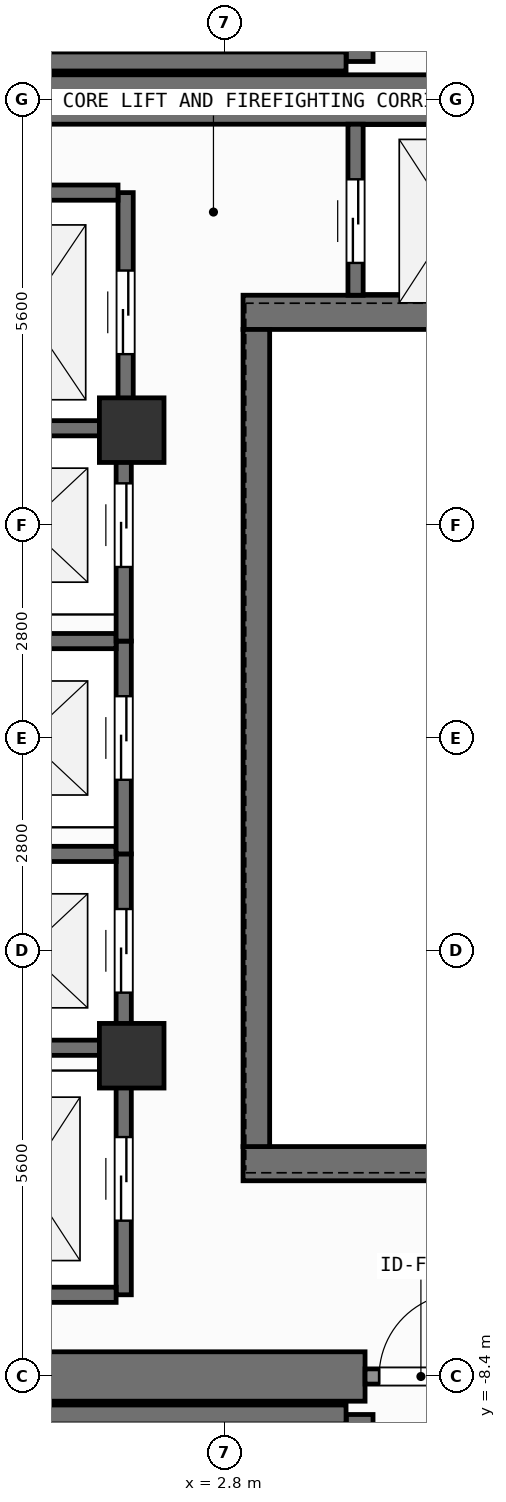
"""IFC4 building model, lengths in metres.
Left out: names, types, materials, properties, quantities, classifications, styles, units other than length and angle.
Written with IfcOpenShell. Run it as: python <this file> out.ifc"""

import sys

from ifc_helpers import new_model, si_unit, direction, frame, frame_2d, origin, origin_2d, place, context, subcontext, project, spatial, rectangle, extrude, element, fill, save


model = new_model("IFC4")
c1 = context("Model", 3, precision=1e-05, world=origin(), true_north=direction((0.0, 1.0)))
c2 = subcontext(c1, "Body", "Model", "MODEL_VIEW")
j1 = project(units=[si_unit("LENGTHUNIT", "METRE"), si_unit("PLANEANGLEUNIT", "RADIAN")], contexts=[c1])
p1 = place(None, origin())
s1 = spatial("IfcSite", under=j1, at=p1, CompositionType="ELEMENT")
p2 = place(p1, origin())
s2 = spatial("IfcBuilding", under=s1, at=p2, CompositionType="ELEMENT")
p3 = place(p2, frame((0.0, 0.0, 301.5)))
s3 = spatial("IfcBuildingStorey", under=s2, at=p3, CompositionType="ELEMENT", Elevation=301.5)
p4 = place(p3, frame((-2.62, -8.4, 0.0), z_axis=(0.0, 0.0, 1.0), x_axis=(1.0, 0.0, 0.0)))
e1 = element("IfcWall", 1, at=p4, inside=s3, PredefinedType="SHEAR", context=c2, shape_type="SweptSolid", body=[
    extrude(rectangle(XDim=7.27, YDim=0.65, at=frame_2d((3.635, 0.0))), origin(), (0.0, 0.0, 1.0), 3.9),
])
p5 = place(p3, frame((-7.55, 8.4, 0.0), z_axis=(0.0, 0.0, 1.0), x_axis=(1.0, 0.0, 0.0)))
e2 = element("IfcWall", 2, at=p5, inside=s3, PredefinedType="SHEAR", context=c2, shape_type="SweptSolid", body=[
    extrude(rectangle(XDim=16.275, YDim=0.65, at=frame_2d((8.138, 0.0))), origin(), (0.0, 0.0, 1.0), 3.9),
])
for number, where, z_axis, x_axis in (
    (3, (3.045, -5.6, 0.0), (0.0, 0.0, 1.0), (1.0, 0.0, 0.0)),
    (4, (3.045, 5.6, 0.0), (0.0, 0.0, 1.0), (1.0, 0.0, 0.0)),
):
    element("IfcWall", number, at=place(p3, frame(where, z_axis=z_axis, x_axis=x_axis)), inside=s3, PredefinedType="SHEAR", context=c2, shape_type="SweptSolid", body=[
        extrude(rectangle(XDim=5.68, YDim=0.45, at=frame_2d((2.84, 0.0))), origin(), (0.0, 0.0, 1.0), 3.9),
    ])
p6 = place(p3, frame((3.22, -5.375, 0.0), z_axis=(0.0, 0.0, 1.0), x_axis=(0.0, 1.0, 0.0)))
e5 = element("IfcWall", 5, at=p6, inside=s3, PredefinedType="SHEAR", context=c2, shape_type="SweptSolid", body=[
    extrude(rectangle(XDim=10.75, YDim=0.35, at=frame_2d((5.375, 0.0))), origin(), (0.0, 0.0, 1.0), 3.9),
])
p7 = place(p3, frame((-2.2, -8.9, 0.0), z_axis=(0.0, 0.0, 1.0), x_axis=(1.0, 0.0, 0.0)))
e6 = element("IfcWall", 6, at=p7, inside=s3, PredefinedType="SHEAR", context=c2, shape_type="SweptSolid", body=[
    extrude(rectangle(XDim=6.6, YDim=0.25, at=frame_2d((3.3, 0.0))), origin(), (0.0, 0.0, 1.0), 3.9),
])
p8 = place(p3, frame((4.58, -8.9, 0.0), z_axis=(0.0, 0.0, 1.0), x_axis=(0.0, -1.0, 0.0)))
e7 = element("IfcWall", 7, at=p8, inside=s3, PredefinedType="SHEAR", context=c2, shape_type="SweptSolid", body=[
    extrude(rectangle(XDim=2.925, YDim=0.35, at=frame_2d((1.462, 0.0))), origin(), (0.0, 0.0, 1.0), 3.9),
])
p9 = place(p8, frame((0.913, 0.0, 0.0)))
e8 = element("IfcOpeningElement", 8, at=p9, cuts=e7, PredefinedType="OPENING", context=c2, shape_type="SweptSolid", body=[
    extrude(rectangle(XDim=1.1, YDim=2.15, at=frame_2d((0.55, 1.075))), frame((0.0, 0.185, 0.0), z_axis=(0.0, -1.0, 0.0), x_axis=(1.0, 0.0, 0.0)), (0.0, 0.0, 1.0), 0.37),
])
p10 = place(p3, frame((-2.2, 8.9, 0.0), z_axis=(0.0, 0.0, 1.0), x_axis=(1.0, 0.0, 0.0)))
e9 = element("IfcWall", 9, at=p10, inside=s3, PredefinedType="SHEAR", context=c2, shape_type="SweptSolid", body=[
    extrude(rectangle(XDim=6.6, YDim=0.25, at=frame_2d((3.3, 0.0))), origin(), (0.0, 0.0, 1.0), 3.9),
])
p11 = place(p3, frame((4.58, 11.825, 0.0), z_axis=(0.0, 0.0, 1.0), x_axis=(0.0, -1.0, 0.0)))
e10 = element("IfcWall", 10, at=p11, inside=s3, PredefinedType="SHEAR", context=c2, shape_type="SweptSolid", body=[
    extrude(rectangle(XDim=2.925, YDim=0.35, at=frame_2d((1.462, 0.0))), origin(), (0.0, 0.0, 1.0), 3.9),
])
p12 = place(p11, frame((0.913, 0.0, 0.0)))
e11 = element("IfcOpeningElement", 11, at=p12, cuts=e10, PredefinedType="OPENING", context=c2, shape_type="SweptSolid", body=[
    extrude(rectangle(XDim=1.1, YDim=2.15, at=frame_2d((0.55, 1.075))), frame((0.0, 0.185, 0.0), z_axis=(0.0, -1.0, 0.0), x_axis=(1.0, 0.0, 0.0)), (0.0, 0.0, 1.0), 0.37),
])
for number, where, z_axis, x_axis in (
    (12, (1.58, -4.18, 0.0), (0.0, 0.0, 1.0), (1.0, 0.0, 0.0)),
    (13, (1.58, 4.05, 0.0), (0.0, 0.0, 1.0), (1.0, 0.0, 0.0)),
):
    element("IfcColumn", number, at=place(p3, frame(where, z_axis=z_axis, x_axis=x_axis)), inside=s3, PredefinedType="COLUMN", context=c2, shape_type="SweptSolid", body=[
        extrude(rectangle(XDim=0.85, YDim=0.85, at=origin_2d()), origin(), (0.0, 0.0, 1.0), 3.9),
    ])
p13 = place(p3, frame((1.475, -4.275, 0.0), z_axis=(0.0, 0.0, 1.0), x_axis=(0.0, 1.0, 0.0)))
e14 = element("IfcWall", 14, at=p13, inside=s3, PredefinedType="SHEAR", context=c2, shape_type="SweptSolid", body=[
    extrude(rectangle(XDim=2.75, YDim=0.2, at=frame_2d((1.375, 0.0))), origin(), (0.0, 0.0, 1.0), 3.68),
])
p14 = place(p13, frame((0.925, 0.0, 0.0)))
e15 = element("IfcOpeningElement", 15, at=p14, cuts=e14, PredefinedType="OPENING", context=c2, shape_type="SweptSolid", body=[
    extrude(rectangle(XDim=1.1, YDim=2.2, at=frame_2d((0.55, 1.1))), frame((0.0, 0.11, 0.0), z_axis=(0.0, -1.0, 0.0), x_axis=(1.0, 0.0, 0.0)), (0.0, 0.0, 1.0), 0.22),
])
for number, where, z_axis, x_axis in (
    (16, (-0.975, -4.075, 0.0), (0.0, 0.0, 1.0), (1.0, 0.0, 0.0)),
    (17, (-0.975, -1.525, 0.0), (0.0, 0.0, 1.0), (1.0, 0.0, 0.0)),
):
    element("IfcWall", number, at=place(p3, frame(where, z_axis=z_axis, x_axis=x_axis)), inside=s3, PredefinedType="SHEAR", context=c2, shape_type="SweptSolid", body=[
        extrude(rectangle(XDim=2.35, YDim=0.2, at=frame_2d((1.175, 0.0))), origin(), (0.0, 0.0, 1.0), 3.68),
    ])
p15 = place(p3, frame((1.475, -1.525, 0.0), z_axis=(0.0, 0.0, 1.0), x_axis=(0.0, 1.0, 0.0)))
e18 = element("IfcWall", 18, at=p15, inside=s3, PredefinedType="SHEAR", context=c2, shape_type="SweptSolid", body=[
    extrude(rectangle(XDim=2.8, YDim=0.2, at=frame_2d((1.4, 0.0))), origin(), (0.0, 0.0, 1.0), 3.68),
])
p16 = place(p15, frame((0.975, 0.0, 0.0)))
e19 = element("IfcOpeningElement", 19, at=p16, cuts=e18, PredefinedType="OPENING", context=c2, shape_type="SweptSolid", body=[
    extrude(rectangle(XDim=1.1, YDim=2.2, at=frame_2d((0.55, 1.1))), frame((0.0, 0.11, 0.0), z_axis=(0.0, -1.0, 0.0), x_axis=(1.0, 0.0, 0.0)), (0.0, 0.0, 1.0), 0.22),
])
p17 = place(p3, frame((-0.975, 1.275, 0.0), z_axis=(0.0, 0.0, 1.0), x_axis=(1.0, 0.0, 0.0)))
e20 = element("IfcWall", 20, at=p17, inside=s3, PredefinedType="SHEAR", context=c2, shape_type="SweptSolid", body=[
    extrude(rectangle(XDim=2.35, YDim=0.2, at=frame_2d((1.175, 0.0))), origin(), (0.0, 0.0, 1.0), 3.68),
])
p18 = place(p3, frame((1.475, 1.275, 0.0), z_axis=(0.0, 0.0, 1.0), x_axis=(0.0, 1.0, 0.0)))
e21 = element("IfcWall", 21, at=p18, inside=s3, PredefinedType="SHEAR", context=c2, shape_type="SweptSolid", body=[
    extrude(rectangle(XDim=2.8, YDim=0.2, at=frame_2d((1.4, 0.0))), origin(), (0.0, 0.0, 1.0), 3.68),
])
p19 = place(p18, frame((0.975, 0.0, 0.0)))
e22 = element("IfcOpeningElement", 22, at=p19, cuts=e21, PredefinedType="OPENING", context=c2, shape_type="SweptSolid", body=[
    extrude(rectangle(XDim=1.1, YDim=2.2, at=frame_2d((0.55, 1.1))), frame((0.0, 0.11, 0.0), z_axis=(0.0, -1.0, 0.0), x_axis=(1.0, 0.0, 0.0)), (0.0, 0.0, 1.0), 0.22),
])
p20 = place(p3, frame((-0.975, 4.075, 0.0), z_axis=(0.0, 0.0, 1.0), x_axis=(1.0, 0.0, 0.0)))
e23 = element("IfcWall", 23, at=p20, inside=s3, PredefinedType="SHEAR", context=c2, shape_type="SweptSolid", body=[
    extrude(rectangle(XDim=2.35, YDim=0.2, at=frame_2d((1.175, 0.0))), origin(), (0.0, 0.0, 1.0), 3.68),
])
p21 = place(p3, frame((1.5, 4.025, 0.0), z_axis=(0.0, 0.0, 1.0), x_axis=(0.0, 1.0, 0.0)))
e24 = element("IfcWall", 24, at=p21, inside=s3, PredefinedType="SHEAR", context=c2, shape_type="SweptSolid", body=[
    extrude(rectangle(XDim=3.15, YDim=0.2, at=frame_2d((1.575, 0.0))), origin(), (0.0, 0.0, 1.0), 3.68),
])
p22 = place(p21, frame((1.025, 0.0, 0.0)))
e25 = element("IfcOpeningElement", 25, at=p22, cuts=e24, PredefinedType="OPENING", context=c2, shape_type="SweptSolid", body=[
    extrude(rectangle(XDim=1.1, YDim=2.2, at=frame_2d((0.55, 1.1))), frame((0.0, 0.11, 0.0), z_axis=(0.0, -1.0, 0.0), x_axis=(1.0, 0.0, 0.0)), (0.0, 0.0, 1.0), 0.22),
])
p23 = place(p3, frame((-1.0, 7.175, 0.0), z_axis=(0.0, 0.0, 1.0), x_axis=(1.0, 0.0, 0.0)))
e26 = element("IfcWall", 26, at=p23, inside=s3, PredefinedType="SHEAR", context=c2, shape_type="SweptSolid", body=[
    extrude(rectangle(XDim=2.4, YDim=0.2, at=frame_2d((1.2, 0.0))), origin(), (0.0, 0.0, 1.0), 3.68),
])
p24 = place(p3, frame((1.475, -7.325, 0.0), z_axis=(0.0, 0.0, 1.0), x_axis=(0.0, 1.0, 0.0)))
e27 = element("IfcWall", 27, at=p24, inside=s3, PredefinedType="SHEAR", context=c2, shape_type="SweptSolid", body=[
    extrude(rectangle(XDim=3.05, YDim=0.2, at=frame_2d((1.525, 0.0))), origin(), (0.0, 0.0, 1.0), 3.68),
])
p25 = place(p24, frame((0.975, 0.0, 0.0)))
e28 = element("IfcOpeningElement", 28, at=p25, cuts=e27, PredefinedType="OPENING", context=c2, shape_type="SweptSolid", body=[
    extrude(rectangle(XDim=1.1, YDim=2.2, at=frame_2d((0.55, 1.1))), frame((0.0, 0.11, 0.0), z_axis=(0.0, -1.0, 0.0), x_axis=(1.0, 0.0, 0.0)), (0.0, 0.0, 1.0), 0.22),
])
p26 = place(p3, frame((-0.975, -7.325, 0.0), z_axis=(0.0, 0.0, 1.0), x_axis=(1.0, 0.0, 0.0)))
e29 = element("IfcWall", 29, at=p26, inside=s3, PredefinedType="SHEAR", context=c2, shape_type="SweptSolid", body=[
    extrude(rectangle(XDim=2.35, YDim=0.2, at=frame_2d((1.175, 0.0))), origin(), (0.0, 0.0, 1.0), 3.68),
])
p27 = place(p3, frame((4.525, 5.825, 0.0), z_axis=(0.0, 0.0, 1.0), x_axis=(0.0, 1.0, 0.0)))
e30 = element("IfcWall", 30, at=p27, inside=s3, PredefinedType="SHEAR", context=c2, shape_type="SweptSolid", body=[
    extrude(rectangle(XDim=2.25, YDim=0.2, at=frame_2d((1.125, 0.0))), origin(), (0.0, 0.0, 1.0), 3.68),
])
p28 = place(p27, frame((0.425, 0.0, 0.0)))
e31 = element("IfcOpeningElement", 31, at=p28, cuts=e30, PredefinedType="OPENING", context=c2, shape_type="SweptSolid", body=[
    extrude(rectangle(XDim=1.1, YDim=2.2, at=frame_2d((0.55, 1.1))), frame((0.0, 0.11, 0.0), z_axis=(0.0, -1.0, 0.0), x_axis=(1.0, 0.0, 0.0)), (0.0, 0.0, 1.0), 0.22),
])
p29 = place(p3, frame((4.65, -8.4, 0.0), z_axis=(0.0, 0.0, 1.0), x_axis=(1.0, 0.0, 0.0)))
e32 = element("IfcWall", 32, at=p29, inside=s3, PredefinedType="SOLIDWALL", context=c2, shape_type="SweptSolid", body=[
    extrude(rectangle(XDim=1.47, YDim=0.2, at=frame_2d((0.735, 0.0))), origin(), (0.0, 0.0, 1.0), 2.92),
])
p30 = place(p29, frame((0.185, 0.0, 0.0)))
e33 = element("IfcOpeningElement", 33, at=p30, cuts=e32, PredefinedType="OPENING", context=c2, shape_type="SweptSolid", body=[
    extrude(rectangle(XDim=1.1, YDim=2.15, at=frame_2d((0.55, 1.075))), frame((0.0, 0.11, 0.0), z_axis=(0.0, -1.0, 0.0), x_axis=(1.0, 0.0, 0.0)), (0.0, 0.0, 1.0), 0.22),
])
p31 = place(p14, origin())
e34 = element("IfcDoor", 34, at=p31, inside=s3, OperationType="SLIDING_TO_LEFT", PredefinedType="DOOR", context=c2, shape_type="SweptSolid", body=[
    extrude(rectangle(XDim=1.1, YDim=2.2, at=frame_2d((0.55, 1.1))), frame((0.0, 0.025, 0.0), z_axis=(0.0, -1.0, 0.0), x_axis=(1.0, 0.0, 0.0)), (0.0, 0.0, 1.0), 0.05),
])
fill(e15, e34)
p32 = place(p16, origin())
e35 = element("IfcDoor", 35, at=p32, inside=s3, OperationType="SLIDING_TO_LEFT", PredefinedType="DOOR", context=c2, shape_type="SweptSolid", body=[
    extrude(rectangle(XDim=1.1, YDim=2.2, at=frame_2d((0.55, 1.1))), frame((0.0, 0.025, 0.0), z_axis=(0.0, -1.0, 0.0), x_axis=(1.0, 0.0, 0.0)), (0.0, 0.0, 1.0), 0.05),
])
fill(e19, e35)
p33 = place(p19, origin())
e36 = element("IfcDoor", 36, at=p33, inside=s3, OperationType="SLIDING_TO_LEFT", PredefinedType="DOOR", context=c2, shape_type="SweptSolid", body=[
    extrude(rectangle(XDim=1.1, YDim=2.2, at=frame_2d((0.55, 1.1))), frame((0.0, 0.025, 0.0), z_axis=(0.0, -1.0, 0.0), x_axis=(1.0, 0.0, 0.0)), (0.0, 0.0, 1.0), 0.05),
])
fill(e22, e36)
p34 = place(p22, origin())
e37 = element("IfcDoor", 37, at=p34, inside=s3, OperationType="SLIDING_TO_LEFT", PredefinedType="DOOR", context=c2, shape_type="SweptSolid", body=[
    extrude(rectangle(XDim=1.1, YDim=2.2, at=frame_2d((0.55, 1.1))), frame((0.0, 0.025, 0.0), z_axis=(0.0, -1.0, 0.0), x_axis=(1.0, 0.0, 0.0)), (0.0, 0.0, 1.0), 0.05),
])
fill(e25, e37)
p35 = place(p25, origin())
e38 = element("IfcDoor", 38, at=p35, inside=s3, OperationType="SLIDING_TO_LEFT", PredefinedType="DOOR", context=c2, shape_type="SweptSolid", body=[
    extrude(rectangle(XDim=1.1, YDim=2.2, at=frame_2d((0.55, 1.1))), frame((0.0, 0.025, 0.0), z_axis=(0.0, -1.0, 0.0), x_axis=(1.0, 0.0, 0.0)), (0.0, 0.0, 1.0), 0.05),
])
fill(e28, e38)
p36 = place(p28, origin())
e39 = element("IfcDoor", 39, at=p36, inside=s3, OperationType="SLIDING_TO_LEFT", PredefinedType="DOOR", context=c2, shape_type="SweptSolid", body=[
    extrude(rectangle(XDim=1.1, YDim=2.2, at=frame_2d((0.55, 1.1))), frame((0.0, 0.025, 0.0), z_axis=(0.0, -1.0, 0.0), x_axis=(1.0, 0.0, 0.0)), (0.0, 0.0, 1.0), 0.05),
])
fill(e31, e39)
p37 = place(p30, origin())
e40 = element("IfcDoor", 40, at=p37, inside=s3, OperationType="SINGLE_SWING_RIGHT", PredefinedType="DOOR", context=c2, shape_type="SweptSolid", body=[
    extrude(rectangle(XDim=1.1, YDim=2.15, at=frame_2d((0.55, 1.075))), frame((0.0, 0.025, 0.0), z_axis=(0.0, -1.0, 0.0), x_axis=(1.0, 0.0, 0.0)), (0.0, 0.0, 1.0), 0.05),
])
fill(e33, e40)
save(model, sys.argv[1])
